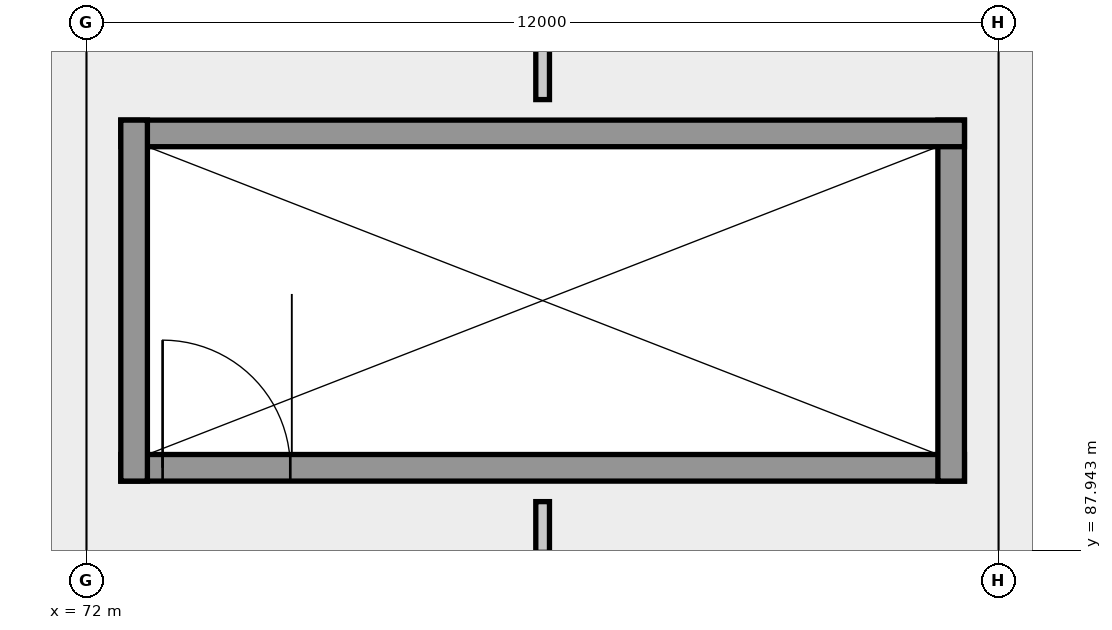
"""IFC4 building model, lengths in metres.
Left out: names, types, materials, properties, quantities, classifications, styles, units other than length and angle.
Written with IfcOpenShell. Run it as: python <this file> out.ifc"""

import sys

from ifc_helpers import new_model, si_unit, direction, frame, frame_2d, origin, place, context, subcontext, project, spatial, rectangle, extrude, element, fill, save


model = new_model("IFC4")
c1 = context("Model", 3, precision=1e-05, world=origin(), true_north=direction((0.0, 1.0)))
c2 = subcontext(c1, "Body", "Model", "MODEL_VIEW")
j1 = project(units=[si_unit("LENGTHUNIT", "METRE"), si_unit("PLANEANGLEUNIT", "RADIAN")], contexts=[c1])
p1 = place(None, origin())
s1 = spatial("IfcSite", under=j1, at=p1, CompositionType="ELEMENT")
p2 = place(p1, origin())
s2 = spatial("IfcBuilding", under=s1, at=p2, CompositionType="ELEMENT")
p3 = place(p2, frame((0.0, 0.0, 16.8)))
s3 = spatial("IfcBuildingStorey", under=s2, at=p3, CompositionType="ELEMENT", Elevation=16.8)
p4 = place(p3, frame((72.45, 89.025, 0.0), z_axis=(0.0, 0.0, 1.0), x_axis=(1.0, 0.0, 0.0)))
e1 = element("IfcWall", 1, at=p4, inside=s3, PredefinedType="SHEAR", context=c2, shape_type="SweptSolid", body=[
    extrude(rectangle(XDim=11.1, YDim=0.35, at=frame_2d((5.55, 0.0))), origin(), (0.0, 0.0, 1.0), 6.35),
])
p5 = place(p4, frame((0.55, 0.0, 0.0)))
e2 = element("IfcOpeningElement", 2, at=p5, cuts=e1, PredefinedType="OPENING", context=c2, shape_type="SweptSolid", body=[
    extrude(rectangle(XDim=1.68, YDim=2.35, at=frame_2d((0.84, 1.175))), frame((0.0, 0.185, 0.0), z_axis=(0.0, -1.0, 0.0), x_axis=(1.0, 0.0, 0.0)), (0.0, 0.0, 1.0), 0.37),
])
p6 = place(p3, frame((83.375, 88.85, 0.0), z_axis=(0.0, 0.0, 1.0), x_axis=(0.0, 1.0, 0.0)))
e3 = element("IfcWall", 3, at=p6, inside=s3, PredefinedType="SHEAR", context=c2, shape_type="SweptSolid", body=[
    extrude(rectangle(XDim=4.75, YDim=0.35, at=frame_2d((2.375, 0.0))), origin(), (0.0, 0.0, 1.0), 6.35),
])
p7 = place(p3, frame((83.55, 93.425, 0.0), z_axis=(0.0, 0.0, 1.0), x_axis=(-1.0, 0.0, 0.0)))
e4 = element("IfcWall", 4, at=p7, inside=s3, PredefinedType="SHEAR", context=c2, shape_type="SweptSolid", body=[
    extrude(rectangle(XDim=11.1, YDim=0.35, at=frame_2d((5.55, 0.0))), origin(), (0.0, 0.0, 1.0), 6.35),
])
p8 = place(p3, frame((72.625, 93.6, 0.0), z_axis=(0.0, 0.0, 1.0), x_axis=(0.0, -1.0, 0.0)))
e5 = element("IfcWall", 5, at=p8, inside=s3, PredefinedType="SHEAR", context=c2, shape_type="SweptSolid", body=[
    extrude(rectangle(XDim=4.75, YDim=0.35, at=frame_2d((2.375, 0.0))), origin(), (0.0, 0.0, 1.0), 6.35),
])
p9 = place(p3, frame((78.0, 84.38, 0.0), z_axis=(0.0, 0.0, 1.0), x_axis=(0.0, 1.0, 0.0)))
e6 = element("IfcWall", 6, at=p9, inside=s3, PredefinedType="PARTITIONING", context=c2, shape_type="SweptSolid", body=[
    extrude(rectangle(XDim=4.2, YDim=0.18, at=frame_2d((2.1, 0.0))), origin(), (0.0, 0.0, 1.0), 6.31),
])
p10 = place(p9, frame((1.6, 0.0, 0.0)))
e7 = element("IfcOpeningElement", 7, at=p10, cuts=e6, PredefinedType="OPENING", context=c2, shape_type="SweptSolid", body=[
    extrude(rectangle(XDim=1.95, YDim=2.45, at=frame_2d((0.975, 1.225))), frame((0.0, 0.1, 0.0), z_axis=(0.0, -1.0, 0.0), x_axis=(1.0, 0.0, 0.0)), (0.0, 0.0, 1.0), 0.2),
])
p11 = place(p3, frame((78.0, 93.87, 0.0), z_axis=(0.0, 0.0, 1.0), x_axis=(0.0, 1.0, 0.0)))
e8 = element("IfcWall", 8, at=p11, inside=s3, PredefinedType="PARTITIONING", context=c2, shape_type="SweptSolid", body=[
    extrude(rectangle(XDim=25.75, YDim=0.18, at=frame_2d((12.875, 0.0))), origin(), (0.0, 0.0, 1.0), 5.87),
])
p12 = place(p5, origin())
e9 = element("IfcDoor", 9, at=p12, inside=s3, OperationType="DOUBLE_DOOR_SINGLE_SWING", PredefinedType="DOOR", context=c2, shape_type="SweptSolid", body=[
    extrude(rectangle(XDim=1.68, YDim=2.35, at=frame_2d((0.84, 1.175))), frame((0.0, 0.025, 0.0), z_axis=(0.0, -1.0, 0.0), x_axis=(1.0, 0.0, 0.0)), (0.0, 0.0, 1.0), 0.05),
])
fill(e2, e9)
save(model, sys.argv[1])
